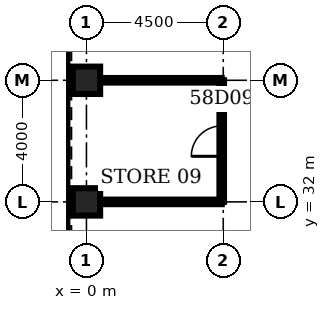
"""IFC4 building model, lengths in metres.
Left out: names, types, materials, properties, quantities, classifications, styles, units other than length and angle.
Written with IfcOpenShell. Run it as: python <this file> out.ifc"""

import sys

from ifc_helpers import new_model, si_unit, direction, frame, frame_2d, origin, origin_2d, place, context, subcontext, project, spatial, rectangle, hollow_rectangle, extrude, element, fill, save


model = new_model("IFC4")
c1 = context("Model", 3, precision=1e-05, world=origin(), true_north=direction((0.0, 1.0)))
c2 = subcontext(c1, "Body", "Model", "MODEL_VIEW")
j1 = project(units=[si_unit("LENGTHUNIT", "METRE"), si_unit("PLANEANGLEUNIT", "RADIAN")], contexts=[c1])
p1 = place(None, origin())
s1 = spatial("IfcSite", under=j1, at=p1, CompositionType="ELEMENT")
p2 = place(p1, origin())
s2 = spatial("IfcBuilding", under=s1, at=p2, CompositionType="ELEMENT")
p3 = place(p2, frame((0.0, 0.0, 257.2)))
s3 = spatial("IfcBuildingStorey", under=s2, at=p3, CompositionType="ELEMENT", Elevation=257.2)
for number, where, z_axis, x_axis in (
    (1, (0.0, 36.0, 0.0), (0.0, 0.0, 1.0), (1.0, 0.0, 0.0)),
    (2, (0.0, 32.0, 0.0), (0.0, 0.0, 1.0), (1.0, 0.0, 0.0)),
):
    element("IfcColumn", number, at=place(p3, frame(where, z_axis=z_axis, x_axis=x_axis)), inside=s3, PredefinedType="COLUMN", context=c2, shape_type="SweptSolid", body=[
        extrude(hollow_rectangle(XDim=0.9, YDim=0.9, WallThickness=0.07, at=origin_2d()), origin(), (0.0, 0.0, 1.0), 4.2),
    ])
for number, where, z_axis, x_axis in (
    (3, (0.45, 32.0, 0.0), (0.0, 0.0, 1.0), (1.0, 0.0, 0.0)),
    (4, (0.45, 36.0, 0.0), (0.0, 0.0, 1.0), (1.0, 0.0, 0.0)),
):
    element("IfcWall", number, at=place(p3, frame(where, z_axis=z_axis, x_axis=x_axis)), inside=s3, PredefinedType="PARTITIONING", context=c2, shape_type="SweptSolid", body=[
        extrude(rectangle(XDim=4.0, YDim=0.15, at=frame_2d((2.0, 0.0))), origin(), (0.0, 0.0, 1.0), 3.0),
    ])
p4 = place(p3, frame((4.45, 32.0, 0.0), z_axis=(0.0, 0.0, 1.0), x_axis=(0.0, 1.0, 0.0)))
e5 = element("IfcWall", 5, at=p4, inside=s3, PredefinedType="PARTITIONING", context=c2, shape_type="SweptSolid", body=[
    extrude(rectangle(XDim=4.0, YDim=0.15, at=frame_2d((2.0, 0.0))), origin(), (0.0, 0.0, 1.0), 3.0),
])
p5 = place(p4, frame((1.5, 0.0, 0.0)))
e6 = element("IfcOpeningElement", 6, at=p5, cuts=e5, PredefinedType="OPENING", context=c2, shape_type="SweptSolid", body=[
    extrude(rectangle(XDim=1.0, YDim=2.1, at=frame_2d((0.5, 1.05))), frame((0.0, 0.085, 0.0), z_axis=(0.0, -1.0, 0.0), x_axis=(1.0, 0.0, 0.0)), (0.0, 0.0, 1.0), 0.17),
])
p6 = place(p5, origin())
e7 = element("IfcDoor", 7, at=p6, inside=s3, OperationType="SINGLE_SWING_LEFT", PredefinedType="DOOR", context=c2, shape_type="SweptSolid", body=[
    extrude(rectangle(XDim=1.0, YDim=2.1, at=frame_2d((0.5, 1.05))), frame((0.0, 0.025, 0.0), z_axis=(0.0, -1.0, 0.0), x_axis=(1.0, 0.0, 0.0)), (0.0, 0.0, 1.0), 0.05),
])
fill(e6, e7)
save(model, sys.argv[1])
